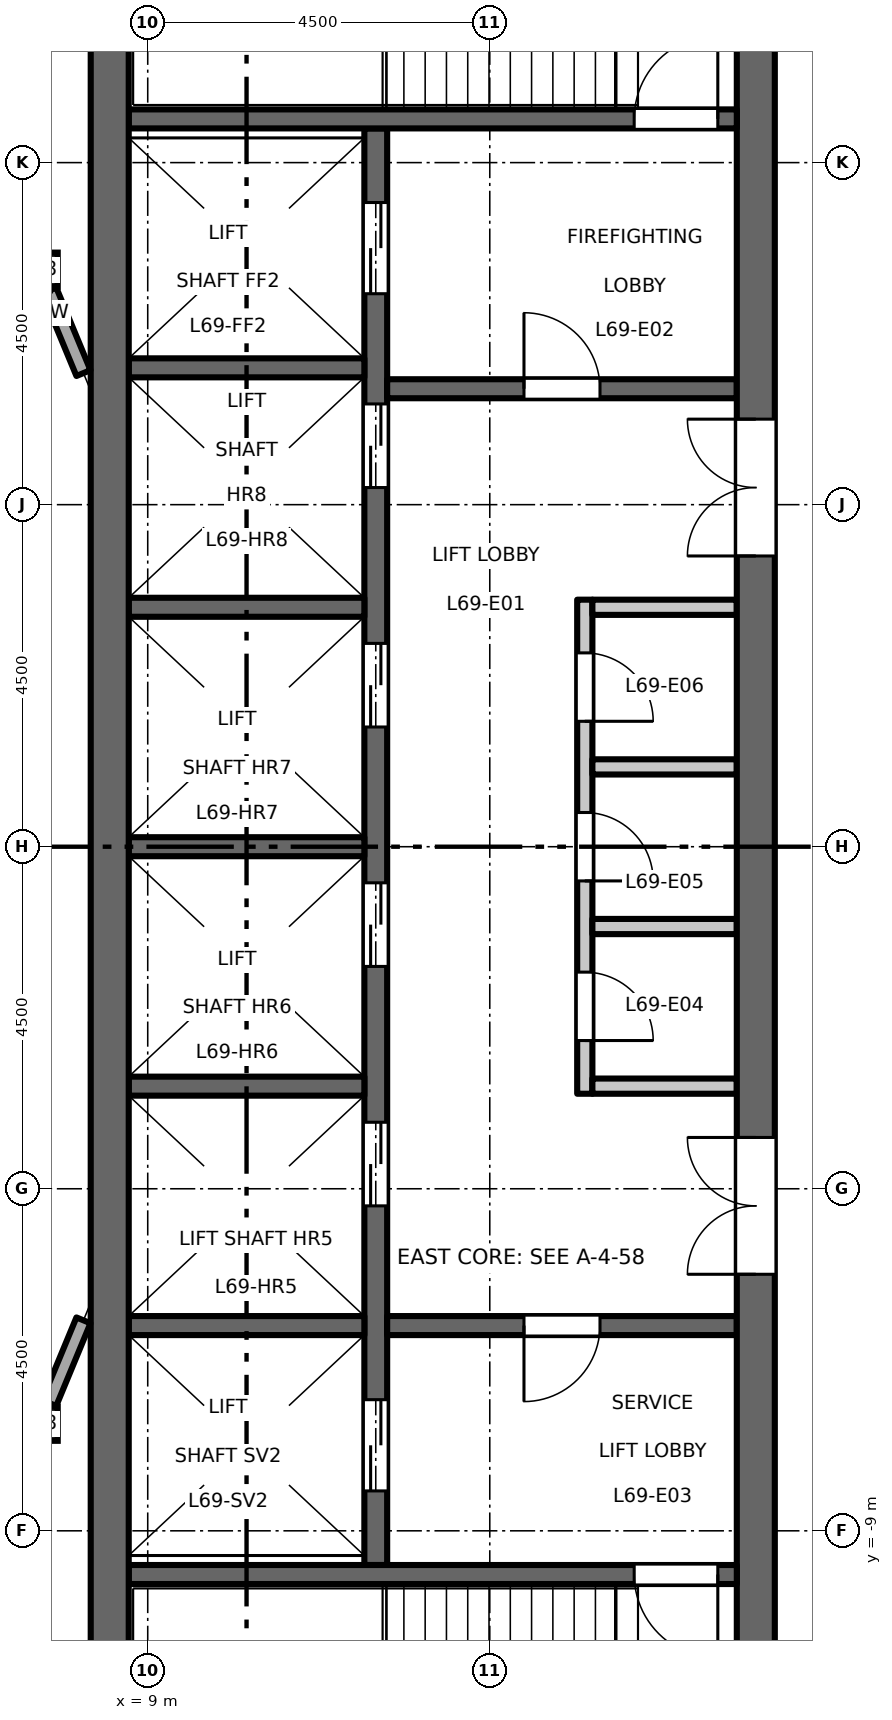
"""IFC4 building model, lengths in metres.
Left out: names, types, materials, properties, quantities, classifications, styles, units other than length and angle.
Written with IfcOpenShell. Run it as: python <this file> out.ifc"""

import sys

from ifc_helpers import new_model, si_unit, direction, frame, frame_2d, origin, origin_2d, place, context, subcontext, project, spatial, rectangle, hollow_rectangle, extrude, element, fill, save


model = new_model("IFC4")
c1 = context("Model", 3, precision=1e-05, world=origin(), true_north=direction((0.0, 1.0)))
c2 = subcontext(c1, "Body", "Model", "MODEL_VIEW")
j1 = project(units=[si_unit("LENGTHUNIT", "METRE"), si_unit("PLANEANGLEUNIT", "RADIAN")], contexts=[c1])
p1 = place(None, origin())
s1 = spatial("IfcSite", under=j1, at=p1, CompositionType="ELEMENT")
p2 = place(p1, origin())
s2 = spatial("IfcBuilding", under=s1, at=p2, CompositionType="ELEMENT")
p3 = place(p2, frame((0.0, 0.0, 321.2)))
s3 = spatial("IfcBuildingStorey", under=s2, at=p3, CompositionType="ELEMENT", Elevation=321.2)
for number, where, z_axis, x_axis in (
    (1, (7.591, -7.591, 0.0), (0.0, 0.0, 1.0), (1.0, 0.0, 0.0)),
    (2, (7.591, 7.591, 0.0), (0.0, 0.0, 1.0), (1.0, 0.0, 0.0)),
):
    element("IfcColumn", number, at=place(p3, frame(where, z_axis=z_axis, x_axis=x_axis)), inside=s3, PredefinedType="COLUMN", context=c2, shape_type="SweptSolid", body=[
        extrude(hollow_rectangle(XDim=0.45, YDim=0.45, WallThickness=0.022, at=origin_2d()), origin(), (0.0, 0.0, 1.0), 4.5),
    ])
p4 = place(p3, frame((14.75, -3.25, 0.0), z_axis=(0.0, 0.0, 1.0), x_axis=(0.0, 1.0, 0.0)))
e3 = element("IfcWall", 3, at=p4, inside=s3, PredefinedType="PARTITIONING", context=c2, shape_type="SweptSolid", body=[
    extrude(rectangle(XDim=6.5, YDim=0.2, at=frame_2d((3.25, 0.0))), origin(), (0.0, 0.0, 1.0), 4.35),
])
p5 = place(p4, frame((0.7, 0.0, 0.0)))
e4 = element("IfcOpeningElement", 4, at=p5, cuts=e3, PredefinedType="OPENING", context=c2, shape_type="SweptSolid", body=[
    extrude(rectangle(XDim=0.9, YDim=2.1, at=frame_2d((0.45, 1.05))), frame((0.0, 0.11, 0.0), z_axis=(0.0, -1.0, 0.0), x_axis=(1.0, 0.0, 0.0)), (0.0, 0.0, 1.0), 0.22),
])
p6 = place(p4, frame((2.8, 0.0, 0.0)))
e5 = element("IfcOpeningElement", 5, at=p6, cuts=e3, PredefinedType="OPENING", context=c2, shape_type="SweptSolid", body=[
    extrude(rectangle(XDim=0.9, YDim=2.1, at=frame_2d((0.45, 1.05))), frame((0.0, 0.11, 0.0), z_axis=(0.0, -1.0, 0.0), x_axis=(1.0, 0.0, 0.0)), (0.0, 0.0, 1.0), 0.22),
])
p7 = place(p4, frame((4.9, 0.0, 0.0)))
e6 = element("IfcOpeningElement", 6, at=p7, cuts=e3, PredefinedType="OPENING", context=c2, shape_type="SweptSolid", body=[
    extrude(rectangle(XDim=0.9, YDim=2.1, at=frame_2d((0.45, 1.05))), frame((0.0, 0.11, 0.0), z_axis=(0.0, -1.0, 0.0), x_axis=(1.0, 0.0, 0.0)), (0.0, 0.0, 1.0), 0.22),
])
for number, where, z_axis, x_axis in (
    (7, (14.85, 3.15, 0.0), (0.0, 0.0, 1.0), (1.0, 0.0, 0.0)),
    (8, (14.85, -3.15, 0.0), (0.0, 0.0, 1.0), (1.0, 0.0, 0.0)),
    (9, (14.85, -1.05, 0.0), (0.0, 0.0, 1.0), (1.0, 0.0, 0.0)),
    (10, (14.85, 1.05, 0.0), (0.0, 0.0, 1.0), (1.0, 0.0, 0.0)),
):
    element("IfcWall", number, at=place(p3, frame(where, z_axis=z_axis, x_axis=x_axis)), inside=s3, PredefinedType="PARTITIONING", context=c2, shape_type="SweptSolid", body=[
        extrude(rectangle(XDim=1.9, YDim=0.2, at=frame_2d((0.95, 0.0))), origin(), (0.0, 0.0, 1.0), 4.35),
    ])
p8 = place(p3, frame((12.0, -9.45, 0.0), z_axis=(0.0, 0.0, 1.0), x_axis=(0.0, 1.0, 0.0)))
e11 = element("IfcWall", 11, at=p8, inside=s3, PredefinedType="SHEAR", context=c2, shape_type="SweptSolid", body=[
    extrude(rectangle(XDim=18.9, YDim=0.3, at=frame_2d((9.45, 0.0))), origin(), (0.0, 0.0, 1.0), 4.35),
])
p9 = place(p8, frame((4.725, 0.0, 0.0)))
e12 = element("IfcOpeningElement", 12, at=p9, cuts=e11, PredefinedType="OPENING", context=c2, shape_type="SweptSolid", body=[
    extrude(rectangle(XDim=1.1, YDim=2.1, at=frame_2d((0.55, 1.05))), frame((0.0, 0.16, 0.0), z_axis=(0.0, -1.0, 0.0), x_axis=(1.0, 0.0, 0.0)), (0.0, 0.0, 1.0), 0.32),
])
p10 = place(p8, frame((7.875, 0.0, 0.0)))
e13 = element("IfcOpeningElement", 13, at=p10, cuts=e11, PredefinedType="OPENING", context=c2, shape_type="SweptSolid", body=[
    extrude(rectangle(XDim=1.1, YDim=2.1, at=frame_2d((0.55, 1.05))), frame((0.0, 0.16, 0.0), z_axis=(0.0, -1.0, 0.0), x_axis=(1.0, 0.0, 0.0)), (0.0, 0.0, 1.0), 0.32),
])
p11 = place(p8, frame((11.025, 0.0, 0.0)))
e14 = element("IfcOpeningElement", 14, at=p11, cuts=e11, PredefinedType="OPENING", context=c2, shape_type="SweptSolid", body=[
    extrude(rectangle(XDim=1.1, YDim=2.1, at=frame_2d((0.55, 1.05))), frame((0.0, 0.16, 0.0), z_axis=(0.0, -1.0, 0.0), x_axis=(1.0, 0.0, 0.0)), (0.0, 0.0, 1.0), 0.32),
])
p12 = place(p8, frame((14.175, 0.0, 0.0)))
e15 = element("IfcOpeningElement", 15, at=p12, cuts=e11, PredefinedType="OPENING", context=c2, shape_type="SweptSolid", body=[
    extrude(rectangle(XDim=1.1, YDim=2.1, at=frame_2d((0.55, 1.05))), frame((0.0, 0.16, 0.0), z_axis=(0.0, -1.0, 0.0), x_axis=(1.0, 0.0, 0.0)), (0.0, 0.0, 1.0), 0.32),
])
p13 = place(p8, frame((16.725, 0.0, 0.0)))
e16 = element("IfcOpeningElement", 16, at=p13, cuts=e11, PredefinedType="OPENING", context=c2, shape_type="SweptSolid", body=[
    extrude(rectangle(XDim=1.2, YDim=2.1, at=frame_2d((0.6, 1.05))), frame((0.0, 0.16, 0.0), z_axis=(0.0, -1.0, 0.0), x_axis=(1.0, 0.0, 0.0)), (0.0, 0.0, 1.0), 0.32),
])
p14 = place(p8, frame((0.975, 0.0, 0.0)))
e17 = element("IfcOpeningElement", 17, at=p14, cuts=e11, PredefinedType="OPENING", context=c2, shape_type="SweptSolid", body=[
    extrude(rectangle(XDim=1.2, YDim=2.1, at=frame_2d((0.6, 1.05))), frame((0.0, 0.16, 0.0), z_axis=(0.0, -1.0, 0.0), x_axis=(1.0, 0.0, 0.0)), (0.0, 0.0, 1.0), 0.32),
])
p15 = place(p3, frame((12.15, 6.025, 0.0), z_axis=(0.0, 0.0, 1.0), x_axis=(1.0, 0.0, 0.0)))
e18 = element("IfcWall", 18, at=p15, inside=s3, PredefinedType="SHEAR", context=c2, shape_type="SweptSolid", body=[
    extrude(rectangle(XDim=4.6, YDim=0.25, at=frame_2d((2.3, 0.0))), origin(), (0.0, 0.0, 1.0), 4.35),
])
p16 = place(p15, frame((1.8, 0.0, 0.0)))
e19 = element("IfcOpeningElement", 19, at=p16, cuts=e18, PredefinedType="OPENING", context=c2, shape_type="SweptSolid", body=[
    extrude(rectangle(XDim=1.0, YDim=2.1, at=frame_2d((0.5, 1.05))), frame((0.0, 0.135, 0.0), z_axis=(0.0, -1.0, 0.0), x_axis=(1.0, 0.0, 0.0)), (0.0, 0.0, 1.0), 0.27),
])
p17 = place(p3, frame((12.15, -6.3, 0.0), z_axis=(0.0, 0.0, 1.0), x_axis=(1.0, 0.0, 0.0)))
e20 = element("IfcWall", 20, at=p17, inside=s3, PredefinedType="SHEAR", context=c2, shape_type="SweptSolid", body=[
    extrude(rectangle(XDim=4.6, YDim=0.25, at=frame_2d((2.3, 0.0))), origin(), (0.0, 0.0, 1.0), 4.35),
])
p18 = place(p17, frame((1.8, 0.0, 0.0)))
e21 = element("IfcOpeningElement", 21, at=p18, cuts=e20, PredefinedType="OPENING", context=c2, shape_type="SweptSolid", body=[
    extrude(rectangle(XDim=1.0, YDim=2.1, at=frame_2d((0.5, 1.05))), frame((0.0, 0.135, 0.0), z_axis=(0.0, -1.0, 0.0), x_axis=(1.0, 0.0, 0.0)), (0.0, 0.0, 1.0), 0.27),
])
p19 = place(p3, frame((17.0, -13.0, 0.0), z_axis=(0.0, 0.0, 1.0), x_axis=(0.0, 1.0, 0.0)))
e22 = element("IfcWall", 22, at=p19, inside=s3, PredefinedType="SHEAR", context=c2, shape_type="SweptSolid", body=[
    extrude(rectangle(XDim=26.0, YDim=0.5, at=frame_2d((13.0, 0.0))), origin(), (0.0, 0.0, 1.0), 4.35),
])
p20 = place(p19, frame((16.825, 0.0, 0.0)))
e23 = element("IfcOpeningElement", 23, at=p20, cuts=e22, PredefinedType="OPENING", context=c2, shape_type="SweptSolid", body=[
    extrude(rectangle(XDim=1.8, YDim=2.1, at=frame_2d((0.9, 1.05))), frame((0.0, 0.26, 0.0), z_axis=(0.0, -1.0, 0.0), x_axis=(1.0, 0.0, 0.0)), (0.0, 0.0, 1.0), 0.52),
])
p21 = place(p19, frame((7.375, 0.0, 0.0)))
e24 = element("IfcOpeningElement", 24, at=p21, cuts=e22, PredefinedType="OPENING", context=c2, shape_type="SweptSolid", body=[
    extrude(rectangle(XDim=1.8, YDim=2.1, at=frame_2d((0.9, 1.05))), frame((0.0, 0.26, 0.0), z_axis=(0.0, -1.0, 0.0), x_axis=(1.0, 0.0, 0.0)), (0.0, 0.0, 1.0), 0.52),
])
for number, where, z_axis, x_axis in (
    (25, (8.75, 0.0, 0.0), (0.0, 0.0, 1.0), (1.0, 0.0, 0.0)),
    (26, (8.75, 3.15, 0.0), (0.0, 0.0, 1.0), (1.0, 0.0, 0.0)),
    (27, (8.75, 6.3, 0.0), (0.0, 0.0, 1.0), (1.0, 0.0, 0.0)),
    (28, (8.75, -3.15, 0.0), (0.0, 0.0, 1.0), (1.0, 0.0, 0.0)),
    (29, (8.75, -6.3, 0.0), (0.0, 0.0, 1.0), (1.0, 0.0, 0.0)),
):
    element("IfcWall", number, at=place(p3, frame(where, z_axis=z_axis, x_axis=x_axis)), inside=s3, PredefinedType="SHEAR", context=c2, shape_type="SweptSolid", body=[
        extrude(rectangle(XDim=3.1, YDim=0.25, at=frame_2d((1.55, 0.0))), origin(), (0.0, 0.0, 1.0), 4.35),
    ])
p22 = place(p3, frame((8.75, 9.575, 0.0), z_axis=(0.0, 0.0, 1.0), x_axis=(1.0, 0.0, 0.0)))
e30 = element("IfcWall", 30, at=p22, inside=s3, PredefinedType="SHEAR", context=c2, shape_type="SweptSolid", body=[
    extrude(rectangle(XDim=8.0, YDim=0.25, at=frame_2d((4.0, 0.0))), origin(), (0.0, 0.0, 1.0), 4.35),
])
p23 = place(p22, frame((6.65, 0.0, 0.0)))
e31 = element("IfcOpeningElement", 31, at=p23, cuts=e30, PredefinedType="OPENING", context=c2, shape_type="SweptSolid", body=[
    extrude(rectangle(XDim=1.1, YDim=2.1, at=frame_2d((0.55, 1.05))), frame((0.0, 0.135, 0.0), z_axis=(0.0, -1.0, 0.0), x_axis=(1.0, 0.0, 0.0)), (0.0, 0.0, 1.0), 0.27),
])
p24 = place(p3, frame((8.75, -9.575, 0.0), z_axis=(0.0, 0.0, 1.0), x_axis=(1.0, 0.0, 0.0)))
e32 = element("IfcWall", 32, at=p24, inside=s3, PredefinedType="SHEAR", context=c2, shape_type="SweptSolid", body=[
    extrude(rectangle(XDim=8.0, YDim=0.25, at=frame_2d((4.0, 0.0))), origin(), (0.0, 0.0, 1.0), 4.35),
])
p25 = place(p24, frame((6.65, 0.0, 0.0)))
e33 = element("IfcOpeningElement", 33, at=p25, cuts=e32, PredefinedType="OPENING", context=c2, shape_type="SweptSolid", body=[
    extrude(rectangle(XDim=1.1, YDim=2.1, at=frame_2d((0.55, 1.05))), frame((0.0, 0.135, 0.0), z_axis=(0.0, -1.0, 0.0), x_axis=(1.0, 0.0, 0.0)), (0.0, 0.0, 1.0), 0.27),
])
p26 = place(p3, frame((8.5, -13.0, 0.0), z_axis=(0.0, 0.0, 1.0), x_axis=(0.0, 1.0, 0.0)))
e34 = element("IfcWall", 34, at=p26, inside=s3, PredefinedType="SHEAR", context=c2, shape_type="SweptSolid", body=[
    extrude(rectangle(XDim=26.0, YDim=0.5, at=frame_2d((13.0, 0.0))), origin(), (0.0, 0.0, 1.0), 4.35),
])
for number, where, z_axis, x_axis in (
    (35, (7.703, -7.319, 0.0), (0.0, 0.0, 1.0), (0.383, 0.924, 0.0)),
    (36, (8.154, 6.231, 0.0), (0.0, 0.0, 1.0), (-0.383, 0.924, 0.0)),
):
    element("IfcWall", number, at=place(p3, frame(where, z_axis=z_axis, x_axis=x_axis)), inside=s3, PredefinedType="STANDARD", context=c2, shape_type="SweptSolid", body=[
        extrude(rectangle(XDim=1.178, YDim=0.2, at=frame_2d((0.589, 0.0))), origin(), (0.0, 0.0, 1.0), 4.01),
    ])
p27 = place(p16, origin())
e37 = element("IfcDoor", 37, at=p27, inside=s3, OperationType="SINGLE_SWING_RIGHT", PredefinedType="DOOR", context=c2, shape_type="SweptSolid", body=[
    extrude(rectangle(XDim=1.0, YDim=2.1, at=frame_2d((0.5, 1.05))), frame((0.0, 0.025, 0.0), z_axis=(0.0, -1.0, 0.0), x_axis=(1.0, 0.0, 0.0)), (0.0, 0.0, 1.0), 0.05),
])
fill(e19, e37)
p28 = place(p18, origin())
e38 = element("IfcDoor", 38, at=p28, inside=s3, OperationType="SINGLE_SWING_LEFT", PredefinedType="DOOR", context=c2, shape_type="SweptSolid", body=[
    extrude(rectangle(XDim=1.0, YDim=2.1, at=frame_2d((0.5, 1.05))), frame((0.0, 0.025, 0.0), z_axis=(0.0, -1.0, 0.0), x_axis=(1.0, 0.0, 0.0)), (0.0, 0.0, 1.0), 0.05),
])
fill(e21, e38)
p29 = place(p23, origin())
e39 = element("IfcDoor", 39, at=p29, inside=s3, OperationType="SINGLE_SWING_LEFT", PredefinedType="DOOR", context=c2, shape_type="SweptSolid", body=[
    extrude(rectangle(XDim=1.1, YDim=2.1, at=frame_2d((0.55, 1.05))), frame((0.0, 0.025, 0.0), z_axis=(0.0, -1.0, 0.0), x_axis=(1.0, 0.0, 0.0)), (0.0, 0.0, 1.0), 0.05),
])
fill(e31, e39)
p30 = place(p25, origin())
e40 = element("IfcDoor", 40, at=p30, inside=s3, OperationType="SINGLE_SWING_RIGHT", PredefinedType="DOOR", context=c2, shape_type="SweptSolid", body=[
    extrude(rectangle(XDim=1.1, YDim=2.1, at=frame_2d((0.55, 1.05))), frame((0.0, 0.025, 0.0), z_axis=(0.0, -1.0, 0.0), x_axis=(1.0, 0.0, 0.0)), (0.0, 0.0, 1.0), 0.05),
])
fill(e33, e40)
p31 = place(p20, origin())
e41 = element("IfcDoor", 41, at=p31, inside=s3, OperationType="DOUBLE_DOOR_DOUBLE_SWING", PredefinedType="DOOR", context=c2, shape_type="SweptSolid", body=[
    extrude(rectangle(XDim=1.8, YDim=2.1, at=frame_2d((0.9, 1.05))), frame((0.0, 0.025, 0.0), z_axis=(0.0, -1.0, 0.0), x_axis=(1.0, 0.0, 0.0)), (0.0, 0.0, 1.0), 0.05),
])
fill(e23, e41)
p32 = place(p21, origin())
e42 = element("IfcDoor", 42, at=p32, inside=s3, OperationType="DOUBLE_DOOR_DOUBLE_SWING", PredefinedType="DOOR", context=c2, shape_type="SweptSolid", body=[
    extrude(rectangle(XDim=1.8, YDim=2.1, at=frame_2d((0.9, 1.05))), frame((0.0, 0.025, 0.0), z_axis=(0.0, -1.0, 0.0), x_axis=(1.0, 0.0, 0.0)), (0.0, 0.0, 1.0), 0.05),
])
fill(e24, e42)
p33 = place(p9, origin())
e43 = element("IfcDoor", 43, at=p33, inside=s3, OperationType="DOUBLE_DOOR_SLIDING", PredefinedType="DOOR", context=c2, shape_type="SweptSolid", body=[
    extrude(rectangle(XDim=1.1, YDim=2.1, at=frame_2d((0.55, 1.05))), frame((0.0, 0.025, 0.0), z_axis=(0.0, -1.0, 0.0), x_axis=(1.0, 0.0, 0.0)), (0.0, 0.0, 1.0), 0.05),
])
fill(e12, e43)
p34 = place(p10, origin())
e44 = element("IfcDoor", 44, at=p34, inside=s3, OperationType="DOUBLE_DOOR_SLIDING", PredefinedType="DOOR", context=c2, shape_type="SweptSolid", body=[
    extrude(rectangle(XDim=1.1, YDim=2.1, at=frame_2d((0.55, 1.05))), frame((0.0, 0.025, 0.0), z_axis=(0.0, -1.0, 0.0), x_axis=(1.0, 0.0, 0.0)), (0.0, 0.0, 1.0), 0.05),
])
fill(e13, e44)
p35 = place(p11, origin())
e45 = element("IfcDoor", 45, at=p35, inside=s3, OperationType="DOUBLE_DOOR_SLIDING", PredefinedType="DOOR", context=c2, shape_type="SweptSolid", body=[
    extrude(rectangle(XDim=1.1, YDim=2.1, at=frame_2d((0.55, 1.05))), frame((0.0, 0.025, 0.0), z_axis=(0.0, -1.0, 0.0), x_axis=(1.0, 0.0, 0.0)), (0.0, 0.0, 1.0), 0.05),
])
fill(e14, e45)
p36 = place(p12, origin())
e46 = element("IfcDoor", 46, at=p36, inside=s3, OperationType="DOUBLE_DOOR_SLIDING", PredefinedType="DOOR", context=c2, shape_type="SweptSolid", body=[
    extrude(rectangle(XDim=1.1, YDim=2.1, at=frame_2d((0.55, 1.05))), frame((0.0, 0.025, 0.0), z_axis=(0.0, -1.0, 0.0), x_axis=(1.0, 0.0, 0.0)), (0.0, 0.0, 1.0), 0.05),
])
fill(e15, e46)
p37 = place(p13, origin())
e47 = element("IfcDoor", 47, at=p37, inside=s3, OperationType="DOUBLE_DOOR_SLIDING", PredefinedType="DOOR", context=c2, shape_type="SweptSolid", body=[
    extrude(rectangle(XDim=1.2, YDim=2.1, at=frame_2d((0.6, 1.05))), frame((0.0, 0.025, 0.0), z_axis=(0.0, -1.0, 0.0), x_axis=(1.0, 0.0, 0.0)), (0.0, 0.0, 1.0), 0.05),
])
fill(e16, e47)
p38 = place(p14, origin())
e48 = element("IfcDoor", 48, at=p38, inside=s3, OperationType="DOUBLE_DOOR_SLIDING", PredefinedType="DOOR", context=c2, shape_type="SweptSolid", body=[
    extrude(rectangle(XDim=1.2, YDim=2.1, at=frame_2d((0.6, 1.05))), frame((0.0, 0.025, 0.0), z_axis=(0.0, -1.0, 0.0), x_axis=(1.0, 0.0, 0.0)), (0.0, 0.0, 1.0), 0.05),
])
fill(e17, e48)
p39 = place(p5, origin())
e49 = element("IfcDoor", 49, at=p39, inside=s3, OperationType="SINGLE_SWING_LEFT", PredefinedType="DOOR", context=c2, shape_type="SweptSolid", body=[
    extrude(rectangle(XDim=0.9, YDim=2.1, at=frame_2d((0.45, 1.05))), frame((0.0, 0.025, 0.0), z_axis=(0.0, -1.0, 0.0), x_axis=(1.0, 0.0, 0.0)), (0.0, 0.0, 1.0), 0.05),
])
fill(e4, e49)
p40 = place(p6, origin())
e50 = element("IfcDoor", 50, at=p40, inside=s3, OperationType="SINGLE_SWING_LEFT", PredefinedType="DOOR", context=c2, shape_type="SweptSolid", body=[
    extrude(rectangle(XDim=0.9, YDim=2.1, at=frame_2d((0.45, 1.05))), frame((0.0, 0.025, 0.0), z_axis=(0.0, -1.0, 0.0), x_axis=(1.0, 0.0, 0.0)), (0.0, 0.0, 1.0), 0.05),
])
fill(e5, e50)
p41 = place(p7, origin())
e51 = element("IfcDoor", 51, at=p41, inside=s3, OperationType="SINGLE_SWING_LEFT", PredefinedType="DOOR", context=c2, shape_type="SweptSolid", body=[
    extrude(rectangle(XDim=0.9, YDim=2.1, at=frame_2d((0.45, 1.05))), frame((0.0, 0.025, 0.0), z_axis=(0.0, -1.0, 0.0), x_axis=(1.0, 0.0, 0.0)), (0.0, 0.0, 1.0), 0.05),
])
fill(e6, e51)
save(model, sys.argv[1])
